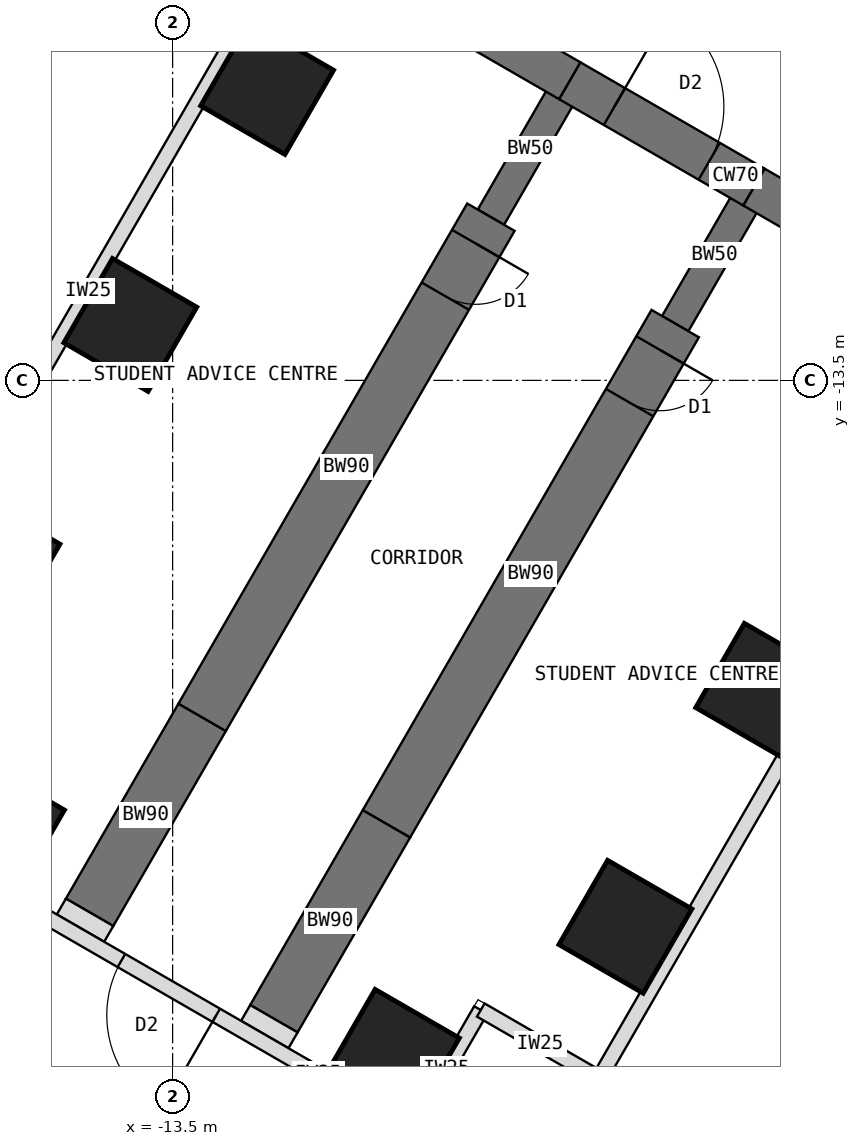
"""IFC4 building model, lengths in metres.
Left out: names, types, materials, properties, quantities, classifications, styles, units other than length and angle.
Written with IfcOpenShell. Run it as: python <this file> out.ifc"""

import sys

from ifc_helpers import new_model, si_unit, direction, frame, frame_2d, origin, origin_2d, place, context, subcontext, project, spatial, rectangle, extrude, element, fill, save


model = new_model("IFC4")
c1 = context("Model", 3, precision=1e-05, world=origin(), true_north=direction((0.0, 1.0)))
c2 = subcontext(c1, "Body", "Model", "MODEL_VIEW")
j1 = project(units=[si_unit("LENGTHUNIT", "METRE"), si_unit("PLANEANGLEUNIT", "RADIAN")], contexts=[c1])
p1 = place(None, origin())
s1 = spatial("IfcSite", under=j1, at=p1, CompositionType="ELEMENT")
p2 = place(p1, origin())
s2 = spatial("IfcBuilding", under=s1, at=p2, CompositionType="ELEMENT")
p3 = place(p2, origin())
s3 = spatial("IfcBuildingStorey", under=s2, at=p3, CompositionType="ELEMENT", Elevation=0.0)
p4 = place(p3, frame((-10.908, -6.298, 0.0), z_axis=(0.0, 0.0, 1.0), x_axis=(0.866034513004, -0.499984222037, 0.0)))
e1 = element("IfcWall", 1, at=p4, inside=s3, PredefinedType="SHEAR", context=c2, shape_type="SweptSolid", body=[
    extrude(rectangle(XDim=4.548, YDim=0.7, at=frame_2d((2.274, 0.0))), origin(), (0.0, 0.0, 1.0), 5.5),
])
p5 = place(p3, frame((-6.97, -8.572, 0.0), z_axis=(0.0, 0.0, 1.0), x_axis=(0.866019471182, -0.500010275428, 0.0)))
e2 = element("IfcWall", 2, at=p5, inside=s3, PredefinedType="SHEAR", context=c2, shape_type="SweptSolid", body=[
    extrude(rectangle(XDim=3.5, YDim=0.7, at=frame_2d((1.75, 0.0))), origin(), (0.0, 0.0, 1.0), 5.5),
])
p6 = place(p5, frame((0.85, 0.0, 0.0)))
e3 = element("IfcOpeningElement", 3, at=p6, cuts=e2, PredefinedType="OPENING", context=c2, shape_type="SweptSolid", body=[
    extrude(rectangle(XDim=1.8, YDim=2.1, at=frame_2d((0.9, 1.05))), frame((0.0, 0.36, 0.0), z_axis=(0.0, -1.0, 0.0), x_axis=(1.0, 0.0, 0.0)), (0.0, 0.0, 1.0), 0.72),
])
p7 = place(p3, frame((-3.939, -10.322, 0.0), z_axis=(0.0, 0.0, 1.0), x_axis=(0.866011268655, -0.500024481964, 0.0)))
e4 = element("IfcWall", 4, at=p7, inside=s3, PredefinedType="SHEAR", context=c2, shape_type="SweptSolid", body=[
    extrude(rectangle(XDim=4.548, YDim=0.7, at=frame_2d((2.274, 0.0))), origin(), (0.0, 0.0, 1.0), 5.5),
])
p8 = place(p3, frame((-3.939, -10.322, 0.0), z_axis=(0.0, 0.0, 1.0), x_axis=(-0.499918158782, -0.866072649678, 0.0)))
e5 = element("IfcWall", 5, at=p8, inside=s3, PredefinedType="SHEAR", context=c2, shape_type="SweptSolid", body=[
    extrude(rectangle(XDim=2.592, YDim=0.5, at=frame_2d((1.296, 0.0))), origin(), (0.0, 0.0, 1.0), 5.5),
])
p9 = place(p3, frame((-5.234, -12.566, 0.0), z_axis=(0.0, 0.0, 1.0), x_axis=(-0.499997557548, -0.86602681393, 0.0)))
e6 = element("IfcWall", 6, at=p9, inside=s3, PredefinedType="SHEAR", context=c2, shape_type="SweptSolid", body=[
    extrude(rectangle(XDim=9.5, YDim=0.9, at=frame_2d((4.75, 0.0))), origin(), (0.0, 0.0, 1.0), 5.5),
])
p10 = place(p9, frame((0.5, 0.0, 0.0)))
e7 = element("IfcOpeningElement", 7, at=p10, cuts=e6, PredefinedType="OPENING", context=c2, shape_type="SweptSolid", body=[
    extrude(rectangle(XDim=1.0, YDim=2.1, at=frame_2d((0.5, 1.05))), frame((0.0, 0.46, 0.0), z_axis=(0.0, -1.0, 0.0), x_axis=(1.0, 0.0, 0.0)), (0.0, 0.0, 1.0), 0.92),
])
p11 = place(p3, frame((-9.984, -20.794, 0.0), z_axis=(0.0, 0.0, 1.0), x_axis=(-0.500042316284, -0.866000971088, 0.0)))
e8 = element("IfcWall", 8, at=p11, inside=s3, PredefinedType="SHEAR", context=c2, shape_type="SweptSolid", body=[
    extrude(rectangle(XDim=3.7, YDim=0.9, at=frame_2d((1.85, 0.0))), origin(), (0.0, 0.0, 1.0), 5.5),
])
p12 = place(p3, frame((-6.97, -8.572, 0.0), z_axis=(0.0, 0.0, 1.0), x_axis=(-0.499988811324, -0.866031863473, 0.0)))
e9 = element("IfcWall", 9, at=p12, inside=s3, PredefinedType="SHEAR", context=c2, shape_type="SweptSolid", body=[
    extrude(rectangle(XDim=2.592, YDim=0.5, at=frame_2d((1.296, 0.0))), origin(), (0.0, 0.0, 1.0), 5.5),
])
p13 = place(p3, frame((-8.266, -10.816, 0.0), z_axis=(0.0, 0.0, 1.0), x_axis=(-0.499997557548, -0.86602681393, 0.0)))
e10 = element("IfcWall", 10, at=p13, inside=s3, PredefinedType="SHEAR", context=c2, shape_type="SweptSolid", body=[
    extrude(rectangle(XDim=9.5, YDim=0.9, at=frame_2d((4.75, 0.0))), origin(), (0.0, 0.0, 1.0), 5.5),
])
p14 = place(p13, frame((0.5, 0.0, 0.0)))
e11 = element("IfcOpeningElement", 11, at=p14, cuts=e10, PredefinedType="OPENING", context=c2, shape_type="SweptSolid", body=[
    extrude(rectangle(XDim=1.0, YDim=2.1, at=frame_2d((0.5, 1.05))), frame((0.0, 0.46, 0.0), z_axis=(0.0, -1.0, 0.0), x_axis=(1.0, 0.0, 0.0)), (0.0, 0.0, 1.0), 0.92),
])
p15 = place(p3, frame((-13.016, -19.044, 0.0), z_axis=(0.0, 0.0, 1.0), x_axis=(-0.499992827086, -0.866029545028, 0.0)))
e12 = element("IfcWall", 12, at=p15, inside=s3, PredefinedType="SHEAR", context=c2, shape_type="SweptSolid", body=[
    extrude(rectangle(XDim=3.7, YDim=0.9, at=frame_2d((1.85, 0.0))), origin(), (0.0, 0.0, 1.0), 5.5),
])
for number, where, z_axis, x_axis in (
    (13, (-11.946, -8.691, 0.0), (0.0, 0.0, 1.0), (0.5, 0.866, 0.0)),
    (14, (-3.804, -18.588, 0.0), (0.0, 0.0, 1.0), (0.5, 0.866, 0.0)),
    (15, (-14.196, -12.588, 0.0), (0.0, 0.0, 1.0), (0.5, 0.866, 0.0)),
    (16, (-6.054, -22.486, 0.0), (0.0, 0.0, 1.0), (0.5, 0.866, 0.0)),
    (17, (-16.446, -16.486, 0.0), (0.0, 0.0, 1.0), (0.5, 0.866, 0.0)),
    (18, (-9.877, -24.608, 0.0), (0.0, 0.0, 1.0), (0.5, 0.866, 0.0)),
    (19, (-16.373, -20.858, 0.0), (0.0, 0.0, 1.0), (0.5, 0.866, 0.0)),
):
    element("IfcColumn", number, at=place(p3, frame(where, z_axis=z_axis, x_axis=x_axis)), inside=s3, PredefinedType="COLUMN", context=c2, shape_type="SweptSolid", body=[
        extrude(rectangle(XDim=1.6, YDim=1.6, at=origin_2d()), origin(), (0.0, 0.0, 1.0), 5.5),
    ])
p16 = place(p3, frame((-11.834, -23.998, 0.0), z_axis=(0.0, 0.0, 1.0), x_axis=(-0.499816412211, -0.866131372301, 0.0)))
e20 = element("IfcWall", 20, at=p16, inside=s3, PredefinedType="PARTITIONING", context=c2, shape_type="SweptSolid", body=[
    extrude(rectangle(XDim=0.3, YDim=0.9, at=frame_2d((0.15, 0.0))), origin(), (0.0, 0.0, 1.0), 5.15),
])
p17 = place(p3, frame((-14.865, -22.248, 0.0), z_axis=(0.0, 0.0, 1.0), x_axis=(-0.500426713919, -0.865778900179, 0.0)))
e21 = element("IfcWall", 21, at=p17, inside=s3, PredefinedType="PARTITIONING", context=c2, shape_type="SweptSolid", body=[
    extrude(rectangle(XDim=0.3, YDim=0.9, at=frame_2d((0.15, 0.0))), origin(), (0.0, 0.0, 1.0), 5.15),
])
p18 = place(p3, frame((-8.432, -23.855, 0.0), z_axis=(0.0, 0.0, 1.0), x_axis=(-0.500013631625, -0.866017533419, 0.0)))
e22 = element("IfcWall", 22, at=p18, inside=s3, PredefinedType="STANDARD", context=c2, shape_type="SweptSolid", body=[
    extrude(rectangle(XDim=2.25, YDim=0.25, at=frame_2d((1.125, 0.0))), origin(), (0.0, 0.0, 1.0), 5.15),
])
p19 = place(p3, frame((-9.557, -25.803, 0.0), z_axis=(0.0, 0.0, 1.0), x_axis=(-0.866025598446, 0.499999662836, 0.0)))
e23 = element("IfcWall", 23, at=p19, inside=s3, PredefinedType="STANDARD", context=c2, shape_type="SweptSolid", body=[
    extrude(rectangle(XDim=9.25, YDim=0.25, at=frame_2d((4.625, 0.0))), origin(), (0.0, 0.0, 1.0), 5.15),
])
p20 = place(p19, frame((3.725, 0.0, 0.0)))
e24 = element("IfcOpeningElement", 24, at=p20, cuts=e23, PredefinedType="OPENING", context=c2, shape_type="SweptSolid", body=[
    extrude(rectangle(XDim=1.8, YDim=2.1, at=frame_2d((0.9, 1.05))), frame((0.0, 0.135, 0.0), z_axis=(0.0, -1.0, 0.0), x_axis=(1.0, 0.0, 0.0)), (0.0, 0.0, 1.0), 0.27),
])
for number, where, z_axis, x_axis in (
    (25, (-18.391, -18.105, 0.0), (0.0, 0.0, 1.0), (0.5, 0.866, 0.0)),
    (26, (0.524, -12.842, 0.0), (0.0, 0.0, 1.0), (-0.5, -0.866, 0.0)),
):
    element("IfcWall", number, at=place(p3, frame(where, z_axis=z_axis, x_axis=x_axis)), inside=s3, PredefinedType="STANDARD", context=c2, shape_type="SweptSolid", body=[
        extrude(rectangle(XDim=14.016, YDim=0.25, at=frame_2d((7.008, 0.0))), origin(), (0.0, 0.0, 1.0), 5.15),
    ])
p21 = place(p3, frame((-6.484, -24.98, 0.0), z_axis=(0.0, 0.0, 1.0), x_axis=(-0.866017533419, 0.500013631625, 0.0)))
e27 = element("IfcWall", 27, at=p21, inside=s3, PredefinedType="STANDARD", context=c2, shape_type="SweptSolid", body=[
    extrude(rectangle(XDim=2.25, YDim=0.25, at=frame_2d((1.125, 0.0))), origin(), (0.0, 0.0, 1.0), 5.15),
])
p22 = place(p6, origin())
e28 = element("IfcDoor", 28, at=p22, inside=s3, OperationType="DOUBLE_DOOR_DOUBLE_SWING", PredefinedType="DOOR", context=c2, shape_type="SweptSolid", body=[
    extrude(rectangle(XDim=1.72, YDim=2.06, at=frame_2d((0.9, 1.03))), frame((0.0, 0.025, 0.0), z_axis=(0.0, -1.0, 0.0), x_axis=(1.0, 0.0, 0.0)), (0.0, 0.0, 1.0), 0.05),
    extrude(rectangle(XDim=0.04, YDim=2.1, at=frame_2d((0.02, 1.05))), frame((0.0, 0.35, 0.0), z_axis=(0.0, -1.0, 0.0), x_axis=(1.0, 0.0, 0.0)), (0.0, 0.0, 1.0), 0.699),
    extrude(rectangle(XDim=0.04, YDim=2.1, at=frame_2d((1.78, 1.05))), frame((0.0, 0.35, 0.0), z_axis=(0.0, -1.0, 0.0), x_axis=(1.0, 0.0, 0.0)), (0.0, 0.0, 1.0), 0.699),
    extrude(rectangle(XDim=1.72, YDim=0.04, at=frame_2d((0.9, 2.08))), frame((0.0, 0.35, 0.0), z_axis=(0.0, -1.0, 0.0), x_axis=(1.0, 0.0, 0.0)), (0.0, 0.0, 1.0), 0.699),
])
fill(e3, e28)
p23 = place(p10, origin())
e29 = element("IfcDoor", 29, at=p23, inside=s3, OperationType="SINGLE_SWING_LEFT", PredefinedType="DOOR", context=c2, shape_type="SweptSolid", body=[
    extrude(rectangle(XDim=0.92, YDim=2.06, at=frame_2d((0.5, 1.03))), frame((0.0, 0.025, 0.0), z_axis=(0.0, -1.0, 0.0), x_axis=(1.0, 0.0, 0.0)), (0.0, 0.0, 1.0), 0.05),
    extrude(rectangle(XDim=0.04, YDim=2.1, at=frame_2d((0.02, 1.05))), frame((0.0, 0.45, 0.0), z_axis=(0.0, -1.0, 0.0), x_axis=(1.0, 0.0, 0.0)), (0.0, 0.0, 1.0), 0.899),
    extrude(rectangle(XDim=0.04, YDim=2.1, at=frame_2d((0.98, 1.05))), frame((0.0, 0.45, 0.0), z_axis=(0.0, -1.0, 0.0), x_axis=(1.0, 0.0, 0.0)), (0.0, 0.0, 1.0), 0.899),
    extrude(rectangle(XDim=0.92, YDim=0.04, at=frame_2d((0.5, 2.08))), frame((0.0, 0.45, 0.0), z_axis=(0.0, -1.0, 0.0), x_axis=(1.0, 0.0, 0.0)), (0.0, 0.0, 1.0), 0.899),
])
fill(e7, e29)
p24 = place(p14, origin())
e30 = element("IfcDoor", 30, at=p24, inside=s3, OperationType="SINGLE_SWING_LEFT", PredefinedType="DOOR", context=c2, shape_type="SweptSolid", body=[
    extrude(rectangle(XDim=0.92, YDim=2.06, at=frame_2d((0.5, 1.03))), frame((0.0, 0.025, 0.0), z_axis=(0.0, -1.0, 0.0), x_axis=(1.0, 0.0, 0.0)), (0.0, 0.0, 1.0), 0.05),
    extrude(rectangle(XDim=0.04, YDim=2.1, at=frame_2d((0.02, 1.05))), frame((0.0, 0.45, 0.0), z_axis=(0.0, -1.0, 0.0), x_axis=(1.0, 0.0, 0.0)), (0.0, 0.0, 1.0), 0.899),
    extrude(rectangle(XDim=0.04, YDim=2.1, at=frame_2d((0.98, 1.05))), frame((0.0, 0.45, 0.0), z_axis=(0.0, -1.0, 0.0), x_axis=(1.0, 0.0, 0.0)), (0.0, 0.0, 1.0), 0.899),
    extrude(rectangle(XDim=0.92, YDim=0.04, at=frame_2d((0.5, 2.08))), frame((0.0, 0.45, 0.0), z_axis=(0.0, -1.0, 0.0), x_axis=(1.0, 0.0, 0.0)), (0.0, 0.0, 1.0), 0.899),
])
fill(e11, e30)
p25 = place(p20, origin())
e31 = element("IfcDoor", 31, at=p25, inside=s3, OperationType="DOUBLE_DOOR_DOUBLE_SWING", PredefinedType="DOOR", context=c2, shape_type="SweptSolid", body=[
    extrude(rectangle(XDim=1.8, YDim=2.1, at=frame_2d((0.9, 1.05))), frame((0.0, 0.025, 0.0), z_axis=(0.0, -1.0, 0.0), x_axis=(1.0, 0.0, 0.0)), (0.0, 0.0, 1.0), 0.05),
])
fill(e24, e31)
save(model, sys.argv[1])
